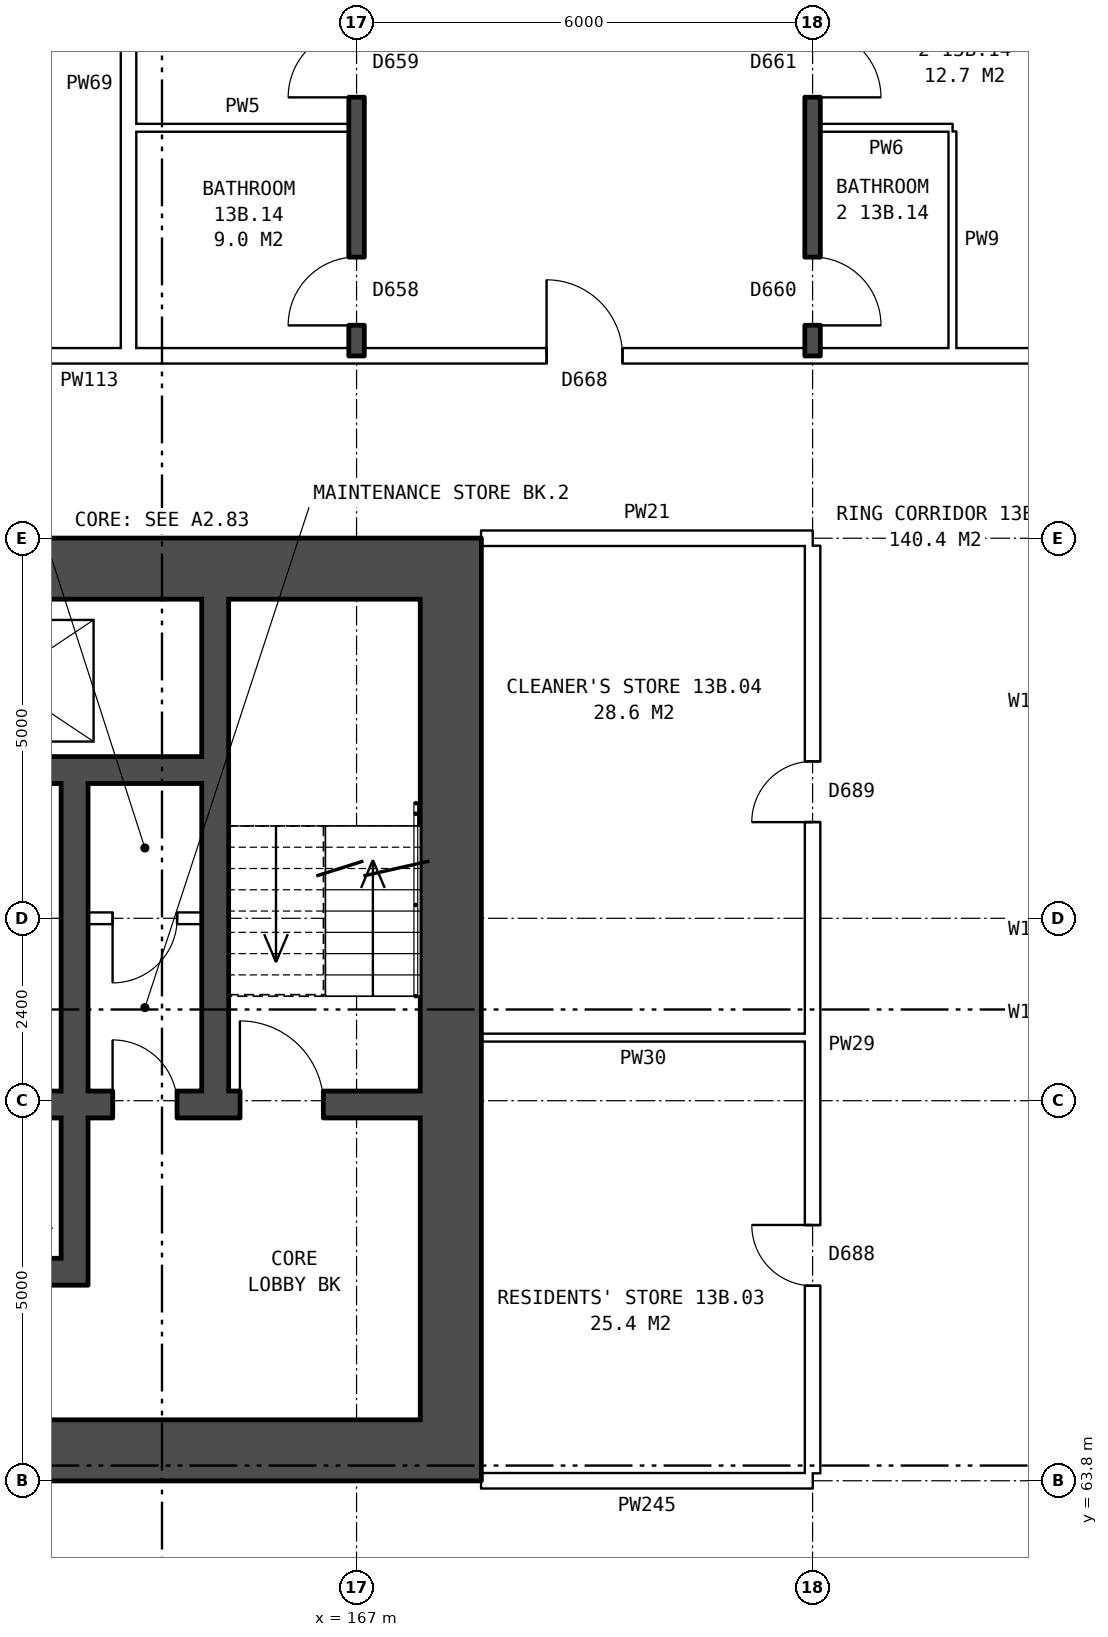
"""IFC4 building model, lengths in metres.
Left out: names, types, materials, properties, quantities, classifications, styles, units other than length and angle.
Written with IfcOpenShell. Run it as: python <this file> out.ifc"""

import sys

from ifc_helpers import new_model, si_unit, direction, frame, frame_2d, origin, place, context, subcontext, project, spatial, rectangle, extrude, element, fill, save


model = new_model("IFC4")
c1 = context("Model", 3, precision=1e-05, world=origin(), true_north=direction((0.0, 1.0)))
c2 = subcontext(c1, "Body", "Model", "MODEL_VIEW")
j1 = project(units=[si_unit("LENGTHUNIT", "METRE"), si_unit("PLANEANGLEUNIT", "RADIAN")], contexts=[c1])
p1 = place(None, origin())
s1 = spatial("IfcSite", under=j1, at=p1, CompositionType="ELEMENT")
p2 = place(p1, origin())
s2 = spatial("IfcBuilding", under=s1, at=p2, CompositionType="ELEMENT")
p3 = place(p2, frame((0.0, 0.0, 50.5)))
s3 = spatial("IfcBuildingStorey", under=s2, at=p3, CompositionType="ELEMENT", Elevation=50.5)
p4 = place(p3, frame((168.24, 75.4, 0.0), z_axis=(0.0, 0.0, 1.0), x_axis=(0.0, -1.0, 0.0)))
e1 = element("IfcWall", 1, at=p4, inside=s3, PredefinedType="SHEAR", context=c2, shape_type="SweptSolid", body=[
    extrude(rectangle(XDim=10.8, YDim=0.8, at=frame_2d((5.4, 0.0))), origin(), (0.0, 0.0, 1.0), 2.85),
])
for number, where, z_axis, x_axis in (
    (2, (160.24, 75.8, 0.0), (0.0, 0.0, 1.0), (1.0, 0.0, 0.0)),
    (3, (160.24, 64.2, 0.0), (0.0, 0.0, 1.0), (1.0, 0.0, 0.0)),
):
    element("IfcWall", number, at=place(p3, frame(where, z_axis=z_axis, x_axis=x_axis)), inside=s3, PredefinedType="SHEAR", context=c2, shape_type="SweptSolid", body=[
        extrude(rectangle(XDim=8.4, YDim=0.8, at=frame_2d((4.2, 0.0))), origin(), (0.0, 0.0, 1.0), 2.85),
    ])
p5 = place(p3, frame((161.04, 73.15, 0.0), z_axis=(0.0, 0.0, 1.0), x_axis=(1.0, 0.0, 0.0)))
e4 = element("IfcWall", 4, at=p5, inside=s3, PredefinedType="SHEAR", context=c2, shape_type="SweptSolid", body=[
    extrude(rectangle(XDim=3.925, YDim=0.35, at=frame_2d((1.962, 0.0))), origin(), (0.0, 0.0, 1.0), 2.85),
])
p6 = place(p3, frame((163.465, 71.2, 0.0), z_axis=(0.0, 0.0, 1.0), x_axis=(1.0, 0.0, 0.0)))
e5 = element("IfcWall", 5, at=p6, inside=s3, PredefinedType="PARTITIONING", context=c2, shape_type="SweptSolid", body=[
    extrude(rectangle(XDim=1.5, YDim=0.15, at=frame_2d((0.75, 0.0))), origin(), (0.0, 0.0, 1.0), 2.85),
])
p7 = place(p6, frame((0.325, 0.0, 0.0)))
e6 = element("IfcOpeningElement", 6, at=p7, cuts=e5, PredefinedType="OPENING", context=c2, shape_type="SweptSolid", body=[
    extrude(rectangle(XDim=0.85, YDim=2.1, at=frame_2d((0.425, 1.05))), frame((0.0, 0.085, 0.0), z_axis=(0.0, -1.0, 0.0), x_axis=(1.0, 0.0, 0.0)), (0.0, 0.0, 1.0), 0.17),
])
p8 = place(p3, frame((161.04, 68.75, 0.0), z_axis=(0.0, 0.0, 1.0), x_axis=(1.0, 0.0, 0.0)))
e7 = element("IfcWall", 7, at=p8, inside=s3, PredefinedType="SHEAR", context=c2, shape_type="SweptSolid", body=[
    extrude(rectangle(XDim=6.8, YDim=0.35, at=frame_2d((3.4, 0.0))), origin(), (0.0, 0.0, 1.0), 2.85),
])
p9 = place(p8, frame((4.425, 0.0, 0.0)))
e8 = element("IfcOpeningElement", 8, at=p9, cuts=e7, PredefinedType="OPENING", context=c2, shape_type="SweptSolid", body=[
    extrude(rectangle(XDim=1.1, YDim=2.1, at=frame_2d((0.55, 1.05))), frame((0.0, 0.185, 0.0), z_axis=(0.0, -1.0, 0.0), x_axis=(1.0, 0.0, 0.0)), (0.0, 0.0, 1.0), 0.37),
])
p10 = place(p8, frame((2.75, 0.0, 0.0)))
e9 = element("IfcOpeningElement", 9, at=p10, cuts=e7, PredefinedType="OPENING", context=c2, shape_type="SweptSolid", body=[
    extrude(rectangle(XDim=0.85, YDim=2.1, at=frame_2d((0.425, 1.05))), frame((0.0, 0.185, 0.0), z_axis=(0.0, -1.0, 0.0), x_axis=(1.0, 0.0, 0.0)), (0.0, 0.0, 1.0), 0.37),
])
p11 = place(p3, frame((161.04, 66.55, 0.0), z_axis=(0.0, 0.0, 1.0), x_axis=(1.0, 0.0, 0.0)))
e10 = element("IfcWall", 10, at=p11, inside=s3, PredefinedType="SHEAR", context=c2, shape_type="SweptSolid", body=[
    extrude(rectangle(XDim=2.075, YDim=0.35, at=frame_2d((1.038, 0.0))), origin(), (0.0, 0.0, 1.0), 2.85),
])
p12 = place(p3, frame((163.29, 72.975, 0.0), z_axis=(0.0, 0.0, 1.0), x_axis=(0.0, -1.0, 0.0)))
e11 = element("IfcWall", 11, at=p12, inside=s3, PredefinedType="SHEAR", context=c2, shape_type="SweptSolid", body=[
    extrude(rectangle(XDim=4.05, YDim=0.35, at=frame_2d((2.025, 0.0))), origin(), (0.0, 0.0, 1.0), 2.85),
])
p13 = place(p3, frame((163.29, 68.575, 0.0), z_axis=(0.0, 0.0, 1.0), x_axis=(0.0, -1.0, 0.0)))
e12 = element("IfcWall", 12, at=p13, inside=s3, PredefinedType="SHEAR", context=c2, shape_type="SweptSolid", body=[
    extrude(rectangle(XDim=2.2, YDim=0.35, at=frame_2d((1.1, 0.0))), origin(), (0.0, 0.0, 1.0), 2.85),
])
p14 = place(p3, frame((165.14, 75.4, 0.0), z_axis=(0.0, 0.0, 1.0), x_axis=(0.0, -1.0, 0.0)))
e13 = element("IfcWall", 13, at=p14, inside=s3, PredefinedType="SHEAR", context=c2, shape_type="SweptSolid", body=[
    extrude(rectangle(XDim=6.475, YDim=0.35, at=frame_2d((3.237, 0.0))), origin(), (0.0, 0.0, 1.0), 2.85),
])
p15 = place(p3, frame((168.64, 63.8, 0.0), z_axis=(0.0, 0.0, 1.0), x_axis=(1.0, 0.0, 0.0)))
e14 = element("IfcWall", 14, at=p15, inside=s3, PredefinedType="PARTITIONING", context=c2, shape_type="SweptSolid", body=[
    extrude(rectangle(XDim=4.36, YDim=0.2, at=frame_2d((2.18, 0.0))), origin(), (0.0, 0.0, 1.0), 2.85),
])
p16 = place(p3, frame((168.64, 69.63, 0.0), z_axis=(0.0, 0.0, 1.0), x_axis=(1.0, 0.0, 0.0)))
e15 = element("IfcWall", 15, at=p16, inside=s3, PredefinedType="PARTITIONING", context=c2, shape_type="SweptSolid", body=[
    extrude(rectangle(XDim=4.26, YDim=0.1, at=frame_2d((2.13, 0.0))), origin(), (0.0, 0.0, 1.0), 2.85),
])
p17 = place(p3, frame((168.64, 76.2, 0.0), z_axis=(0.0, 0.0, 1.0), x_axis=(1.0, 0.0, 0.0)))
e16 = element("IfcWall", 16, at=p17, inside=s3, PredefinedType="PARTITIONING", context=c2, shape_type="SweptSolid", body=[
    extrude(rectangle(XDim=4.36, YDim=0.2, at=frame_2d((2.18, 0.0))), origin(), (0.0, 0.0, 1.0), 2.85),
])
p18 = place(p3, frame((155.1, 78.6, 0.0), z_axis=(0.0, 0.0, 1.0), x_axis=(1.0, 0.0, 0.0)))
e17 = element("IfcWall", 17, at=p18, inside=s3, PredefinedType="PARTITIONING", context=c2, shape_type="SweptSolid", body=[
    extrude(rectangle(XDim=21.04, YDim=0.2, at=frame_2d((10.52, 0.0))), origin(), (0.0, 0.0, 1.0), 2.85),
])
p19 = place(p18, frame((2.45, 0.0, 0.0)))
e18 = element("IfcOpeningElement", 18, at=p19, cuts=e17, PredefinedType="OPENING", context=c2, shape_type="SweptSolid", body=[
    extrude(rectangle(XDim=1.0, YDim=2.1, at=frame_2d((0.5, 1.05))), frame((0.0, 0.11, 0.0), z_axis=(0.0, -1.0, 0.0), x_axis=(1.0, 0.0, 0.0)), (0.0, 0.0, 1.0), 0.22),
])
p20 = place(p18, frame((14.4, 0.0, 0.0)))
e19 = element("IfcOpeningElement", 19, at=p20, cuts=e17, PredefinedType="OPENING", context=c2, shape_type="SweptSolid", body=[
    extrude(rectangle(XDim=1.0, YDim=2.1, at=frame_2d((0.5, 1.05))), frame((0.0, 0.11, 0.0), z_axis=(0.0, -1.0, 0.0), x_axis=(1.0, 0.0, 0.0)), (0.0, 0.0, 1.0), 0.22),
])
p21 = place(p3, frame((164.1, 81.6, 0.0), z_axis=(0.0, 0.0, 1.0), x_axis=(1.0, 0.0, 0.0)))
e20 = element("IfcWall", 20, at=p21, inside=s3, PredefinedType="PARTITIONING", context=c2, shape_type="SweptSolid", body=[
    extrude(rectangle(XDim=2.8, YDim=0.1, at=frame_2d((1.4, 0.0))), origin(), (0.0, 0.0, 1.0), 2.85),
])
p22 = place(p3, frame((173.1, 81.6, 0.0), z_axis=(0.0, 0.0, 1.0), x_axis=(1.0, 0.0, 0.0)))
e21 = element("IfcWall", 21, at=p22, inside=s3, PredefinedType="PARTITIONING", context=c2, shape_type="SweptSolid", body=[
    extrude(rectangle(XDim=1.74, YDim=0.1, at=frame_2d((0.87, 0.0))), origin(), (0.0, 0.0, 1.0), 2.85),
])
p23 = place(p3, frame((164.0, 78.7, 0.0), z_axis=(0.0, 0.0, 1.0), x_axis=(0.0, 1.0, 0.0)))
e22 = element("IfcWall", 22, at=p23, inside=s3, PredefinedType="PARTITIONING", context=c2, shape_type="SweptSolid", body=[
    extrude(rectangle(XDim=6.94, YDim=0.2, at=frame_2d((3.47, 0.0))), origin(), (0.0, 0.0, 1.0), 2.85),
])
p24 = place(p3, frame((167.0, 78.6, 0.0), z_axis=(0.0, 0.0, 1.0), x_axis=(0.0, 1.0, 0.0)))
e23 = element("IfcWall", 23, at=p24, inside=s3, PredefinedType="SOLIDWALL", context=c2, shape_type="SweptSolid", body=[
    extrude(rectangle(XDim=7.04, YDim=0.2, at=frame_2d((3.52, 0.0))), origin(), (0.0, 0.0, 1.0), 2.85),
])
p25 = place(p24, frame((3.4, 0.0, 0.0)))
e24 = element("IfcOpeningElement", 24, at=p25, cuts=e23, PredefinedType="OPENING", context=c2, shape_type="SweptSolid", body=[
    extrude(rectangle(XDim=0.9, YDim=2.1, at=frame_2d((0.45, 1.05))), frame((0.0, 0.11, 0.0), z_axis=(0.0, -1.0, 0.0), x_axis=(1.0, 0.0, 0.0)), (0.0, 0.0, 1.0), 0.22),
])
p26 = place(p24, frame((0.4, 0.0, 0.0)))
e25 = element("IfcOpeningElement", 25, at=p26, cuts=e23, PredefinedType="OPENING", context=c2, shape_type="SweptSolid", body=[
    extrude(rectangle(XDim=0.9, YDim=2.1, at=frame_2d((0.45, 1.05))), frame((0.0, 0.11, 0.0), z_axis=(0.0, -1.0, 0.0), x_axis=(1.0, 0.0, 0.0)), (0.0, 0.0, 1.0), 0.22),
])
p27 = place(p3, frame((173.0, 63.9, 0.0), z_axis=(0.0, 0.0, 1.0), x_axis=(0.0, 1.0, 0.0)))
e26 = element("IfcWall", 26, at=p27, inside=s3, PredefinedType="PARTITIONING", context=c2, shape_type="SweptSolid", body=[
    extrude(rectangle(XDim=12.2, YDim=0.2, at=frame_2d((6.1, 0.0))), origin(), (0.0, 0.0, 1.0), 2.85),
])
p28 = place(p27, frame((2.465, 0.0, 0.0)))
e27 = element("IfcOpeningElement", 27, at=p28, cuts=e26, PredefinedType="OPENING", context=c2, shape_type="SweptSolid", body=[
    extrude(rectangle(XDim=0.8, YDim=2.1, at=frame_2d((0.4, 1.05))), frame((0.0, 0.11, 0.0), z_axis=(0.0, -1.0, 0.0), x_axis=(1.0, 0.0, 0.0)), (0.0, 0.0, 1.0), 0.22),
])
p29 = place(p27, frame((8.565, 0.0, 0.0)))
e28 = element("IfcOpeningElement", 28, at=p29, cuts=e26, PredefinedType="OPENING", context=c2, shape_type="SweptSolid", body=[
    extrude(rectangle(XDim=0.8, YDim=2.1, at=frame_2d((0.4, 1.05))), frame((0.0, 0.11, 0.0), z_axis=(0.0, -1.0, 0.0), x_axis=(1.0, 0.0, 0.0)), (0.0, 0.0, 1.0), 0.22),
])
p30 = place(p3, frame((173.0, 78.6, 0.0), z_axis=(0.0, 0.0, 1.0), x_axis=(0.0, 1.0, 0.0)))
e29 = element("IfcWall", 29, at=p30, inside=s3, PredefinedType="SOLIDWALL", context=c2, shape_type="SweptSolid", body=[
    extrude(rectangle(XDim=7.04, YDim=0.2, at=frame_2d((3.52, 0.0))), origin(), (0.0, 0.0, 1.0), 2.85),
])
p31 = place(p30, frame((3.4, 0.0, 0.0)))
e30 = element("IfcOpeningElement", 30, at=p31, cuts=e29, PredefinedType="OPENING", context=c2, shape_type="SweptSolid", body=[
    extrude(rectangle(XDim=0.9, YDim=2.1, at=frame_2d((0.45, 1.05))), frame((0.0, 0.11, 0.0), z_axis=(0.0, -1.0, 0.0), x_axis=(1.0, 0.0, 0.0)), (0.0, 0.0, 1.0), 0.22),
])
p32 = place(p30, frame((0.4, 0.0, 0.0)))
e31 = element("IfcOpeningElement", 31, at=p32, cuts=e29, PredefinedType="OPENING", context=c2, shape_type="SweptSolid", body=[
    extrude(rectangle(XDim=0.9, YDim=2.1, at=frame_2d((0.45, 1.05))), frame((0.0, 0.11, 0.0), z_axis=(0.0, -1.0, 0.0), x_axis=(1.0, 0.0, 0.0)), (0.0, 0.0, 1.0), 0.22),
])
p33 = place(p3, frame((174.84, 78.7, 0.0), z_axis=(0.0, 0.0, 1.0), x_axis=(0.0, 1.0, 0.0)))
e32 = element("IfcWall", 32, at=p33, inside=s3, PredefinedType="PARTITIONING", context=c2, shape_type="SweptSolid", body=[
    extrude(rectangle(XDim=2.85, YDim=0.1, at=frame_2d((1.425, 0.0))), origin(), (0.0, 0.0, 1.0), 2.85),
])
p34 = place(p9, origin())
e33 = element("IfcDoor", 33, at=p34, inside=s3, OperationType="SINGLE_SWING_LEFT", PredefinedType="DOOR", context=c2, shape_type="SweptSolid", body=[
    extrude(rectangle(XDim=1.1, YDim=2.1, at=frame_2d((0.55, 1.05))), frame((0.0, 0.025, 0.0), z_axis=(0.0, -1.0, 0.0), x_axis=(1.0, 0.0, 0.0)), (0.0, 0.0, 1.0), 0.05),
])
fill(e8, e33)
p35 = place(p10, origin())
e34 = element("IfcDoor", 34, at=p35, inside=s3, OperationType="SINGLE_SWING_LEFT", PredefinedType="DOOR", context=c2, shape_type="SweptSolid", body=[
    extrude(rectangle(XDim=0.85, YDim=2.1, at=frame_2d((0.425, 1.05))), frame((0.0, 0.025, 0.0), z_axis=(0.0, -1.0, 0.0), x_axis=(1.0, 0.0, 0.0)), (0.0, 0.0, 1.0), 0.05),
])
fill(e9, e34)
p36 = place(p7, frame((0.85, 0.0, 0.0), z_axis=(0.0, 0.0, 1.0), x_axis=(-1.0, 0.0, 0.0)))
e35 = element("IfcDoor", 35, at=p36, inside=s3, OperationType="SINGLE_SWING_RIGHT", PredefinedType="DOOR", context=c2, shape_type="SweptSolid", body=[
    extrude(rectangle(XDim=0.85, YDim=2.1, at=frame_2d((0.425, 1.05))), frame((0.0, 0.025, 0.0), z_axis=(0.0, -1.0, 0.0), x_axis=(1.0, 0.0, 0.0)), (0.0, 0.0, 1.0), 0.05),
])
fill(e6, e35)
p37 = place(p28, origin())
e36 = element("IfcDoor", 36, at=p37, inside=s3, OperationType="SINGLE_SWING_RIGHT", PredefinedType="DOOR", context=c2, shape_type="SweptSolid", body=[
    extrude(rectangle(XDim=0.8, YDim=2.1, at=frame_2d((0.4, 1.05))), frame((0.0, 0.025, 0.0), z_axis=(0.0, -1.0, 0.0), x_axis=(1.0, 0.0, 0.0)), (0.0, 0.0, 1.0), 0.05),
])
fill(e27, e36)
p38 = place(p29, origin())
e37 = element("IfcDoor", 37, at=p38, inside=s3, OperationType="SINGLE_SWING_LEFT", PredefinedType="DOOR", context=c2, shape_type="SweptSolid", body=[
    extrude(rectangle(XDim=0.8, YDim=2.1, at=frame_2d((0.4, 1.05))), frame((0.0, 0.025, 0.0), z_axis=(0.0, -1.0, 0.0), x_axis=(1.0, 0.0, 0.0)), (0.0, 0.0, 1.0), 0.05),
])
fill(e28, e37)
p39 = place(p25, origin())
e38 = element("IfcDoor", 38, at=p39, inside=s3, OperationType="SINGLE_SWING_LEFT", PredefinedType="DOOR", context=c2, shape_type="SweptSolid", body=[
    extrude(rectangle(XDim=0.9, YDim=2.1, at=frame_2d((0.45, 1.05))), frame((0.0, 0.025, 0.0), z_axis=(0.0, -1.0, 0.0), x_axis=(1.0, 0.0, 0.0)), (0.0, 0.0, 1.0), 0.05),
])
fill(e24, e38)
p40 = place(p31, frame((0.9, 0.0, 0.0), z_axis=(0.0, 0.0, 1.0), x_axis=(-1.0, 0.0, 0.0)))
e39 = element("IfcDoor", 39, at=p40, inside=s3, OperationType="SINGLE_SWING_RIGHT", PredefinedType="DOOR", context=c2, shape_type="SweptSolid", body=[
    extrude(rectangle(XDim=0.9, YDim=2.1, at=frame_2d((0.45, 1.05))), frame((0.0, 0.025, 0.0), z_axis=(0.0, -1.0, 0.0), x_axis=(1.0, 0.0, 0.0)), (0.0, 0.0, 1.0), 0.05),
])
fill(e30, e39)
p41 = place(p20, origin())
e40 = element("IfcDoor", 40, at=p41, inside=s3, OperationType="SINGLE_SWING_LEFT", PredefinedType="DOOR", context=c2, shape_type="SweptSolid", body=[
    extrude(rectangle(XDim=1.0, YDim=2.1, at=frame_2d((0.5, 1.05))), frame((0.0, 0.025, 0.0), z_axis=(0.0, -1.0, 0.0), x_axis=(1.0, 0.0, 0.0)), (0.0, 0.0, 1.0), 0.05),
])
fill(e19, e40)
p42 = place(p26, origin())
e41 = element("IfcDoor", 41, at=p42, inside=s3, OperationType="SINGLE_SWING_LEFT", PredefinedType="DOOR", context=c2, shape_type="SweptSolid", body=[
    extrude(rectangle(XDim=0.9, YDim=2.1, at=frame_2d((0.45, 1.05))), frame((0.0, 0.025, 0.0), z_axis=(0.0, -1.0, 0.0), x_axis=(1.0, 0.0, 0.0)), (0.0, 0.0, 1.0), 0.05),
])
fill(e25, e41)
p43 = place(p32, frame((0.9, 0.0, 0.0), z_axis=(0.0, 0.0, 1.0), x_axis=(-1.0, 0.0, 0.0)))
e42 = element("IfcDoor", 42, at=p43, inside=s3, OperationType="SINGLE_SWING_RIGHT", PredefinedType="DOOR", context=c2, shape_type="SweptSolid", body=[
    extrude(rectangle(XDim=0.9, YDim=2.1, at=frame_2d((0.45, 1.05))), frame((0.0, 0.025, 0.0), z_axis=(0.0, -1.0, 0.0), x_axis=(1.0, 0.0, 0.0)), (0.0, 0.0, 1.0), 0.05),
])
fill(e31, e42)
save(model, sys.argv[1])
